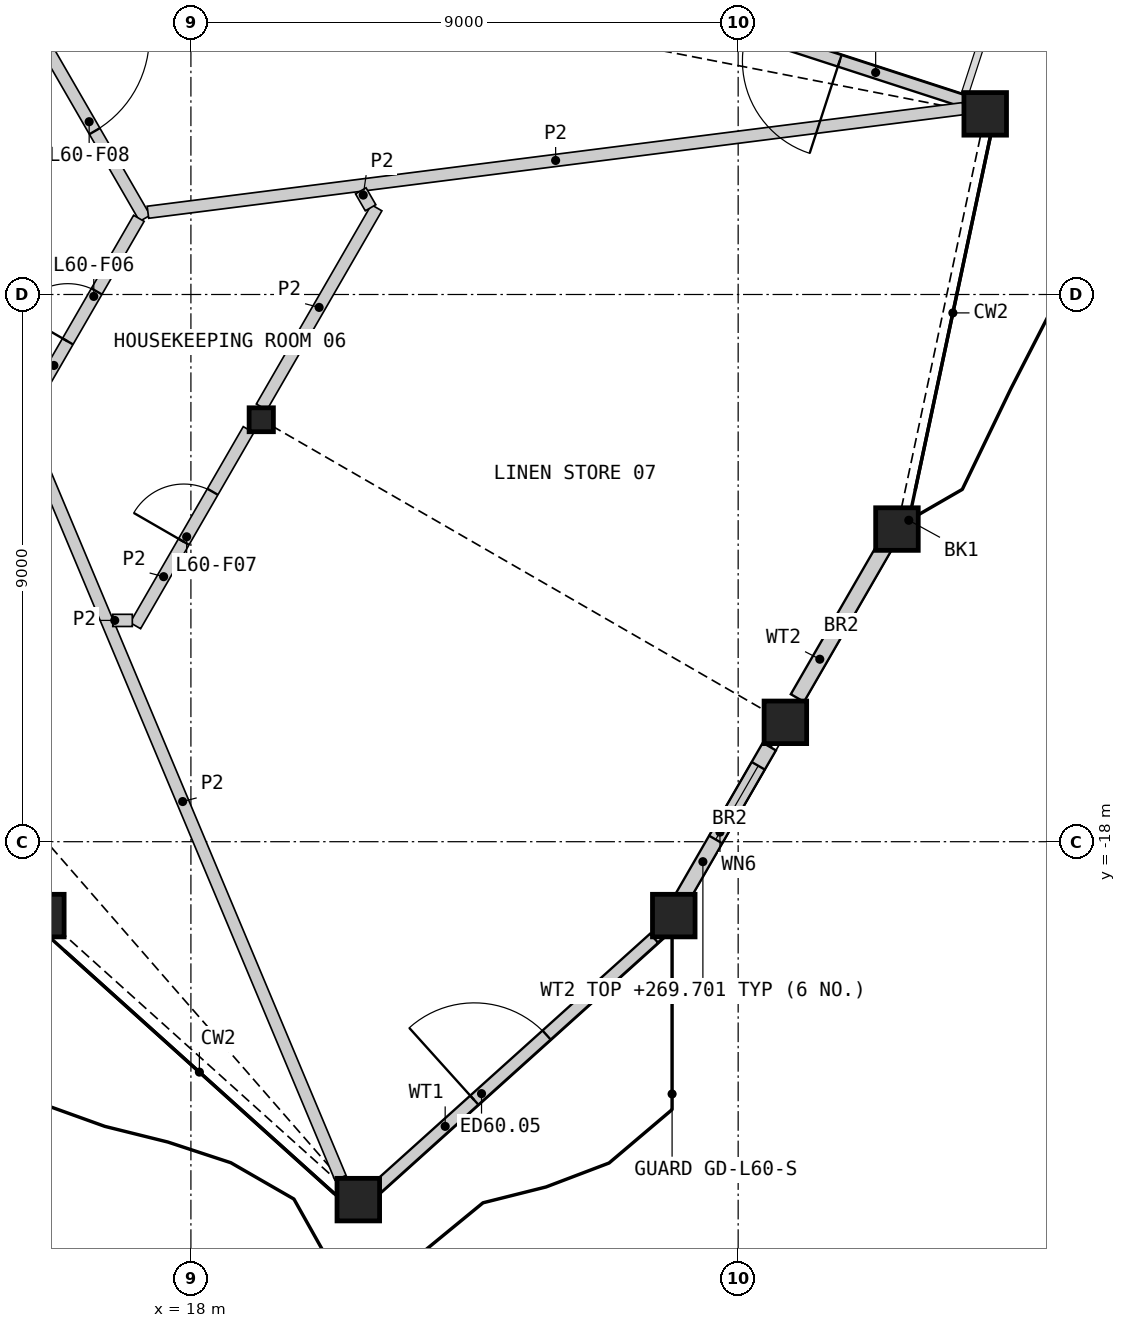
"""IFC4 building model, lengths in metres.
Left out: names, types, materials, properties, quantities, classifications, styles, units other than length and angle.
Written with IfcOpenShell. Run it as: python <this file> out.ifc"""

import sys

from ifc_helpers import new_model, si_unit, direction, frame, frame_2d, origin, origin_2d, place, context, subcontext, project, spatial, rectangle, hollow_rectangle, i_section, extrude, element, fill, save


model = new_model("IFC4")
c1 = context("Model", 3, precision=1e-05, world=origin(), true_north=direction((0.0, 1.0)))
c2 = subcontext(c1, "Body", "Model", "MODEL_VIEW")
j1 = project(units=[si_unit("LENGTHUNIT", "METRE"), si_unit("PLANEANGLEUNIT", "RADIAN")], contexts=[c1])
p1 = place(None, origin())
s1 = spatial("IfcSite", under=j1, at=p1, CompositionType="ELEMENT")
p2 = place(p1, origin())
s2 = spatial("IfcBuilding", under=s1, at=p2, CompositionType="ELEMENT")
p3 = place(p2, frame((0.0, 0.0, 267.0)))
s3 = spatial("IfcBuildingStorey", under=s2, at=p3, CompositionType="ELEMENT", Elevation=267.0)
for number, where, z_axis, x_axis in (
    (1, (15.565, -19.215, 0.0), (0.0, 0.0, 1.0), (1.0, 0.0, 0.0)),
    (2, (20.753, -23.887, 0.0), (0.0, 0.0, 1.0), (1.0, 0.0, 0.0)),
    (3, (25.941, -19.215, 0.0), (0.0, 0.0, 1.0), (1.0, 0.0, 0.0)),
    (4, (27.776, -16.037, 0.0), (0.0, 0.0, 1.0), (1.0, 0.0, 0.0)),
    (5, (29.612, -12.858, 0.0), (0.0, 0.0, 1.0), (1.0, 0.0, 0.0)),
    (6, (31.063, -6.029, 0.0), (0.0, 0.0, 1.0), (1.0, 0.0, 0.0)),
):
    element("IfcColumn", number, at=place(p3, frame(where, z_axis=z_axis, x_axis=x_axis)), inside=s3, PredefinedType="COLUMN", context=c2, shape_type="SweptSolid", body=[
        extrude(hollow_rectangle(XDim=0.7, YDim=0.7, WallThickness=0.045, at=origin_2d()), origin(), (0.0, 0.0, 1.0), 3.6),
    ])
p4 = place(p3, frame((19.157, -11.06, 0.0), z_axis=(0.0, 0.0, 1.0), x_axis=(1.0, 0.0, 0.0)))
e7 = element("IfcColumn", 7, at=p4, inside=s3, PredefinedType="COLUMN", context=c2, shape_type="SweptSolid", body=[
    extrude(i_section(OverallWidth=0.399, OverallDepth=0.393, WebThickness=0.023, FlangeThickness=0.037, at=origin_2d()), origin(), (0.0, 0.0, 1.0), 3.6),
])
p5 = place(p3, frame((21.036, -23.713, 0.0), z_axis=(0.0, 0.0, 1.0), x_axis=(0.743142515738, 0.669133171575, 0.0)))
e8 = element("IfcWall", 8, at=p5, inside=s3, PredefinedType="SOLIDWALL", context=c2, shape_type="SweptSolid", body=[
    extrude(rectangle(XDim=6.166, YDim=0.2, at=frame_2d((3.083, 0.0))), origin(), (0.0, 0.0, 1.0), 2.701),
])
p6 = place(p5, frame((2.186, 0.0, 0.0)))
e9 = element("IfcOpeningElement", 9, at=p6, cuts=e8, PredefinedType="OPENING", context=c2, shape_type="SweptSolid", body=[
    extrude(rectangle(XDim=1.6, YDim=2.4, at=frame_2d((0.8, 1.2))), frame((0.0, 0.11, 0.0), z_axis=(0.0, -1.0, 0.0), x_axis=(1.0, 0.0, 0.0)), (0.0, 0.0, 1.0), 0.22),
])
p7 = place(p3, frame((26.056, -18.96, 0.0), z_axis=(0.0, 0.0, 1.0), x_axis=(0.499949632511, 0.866054481515, 0.0)))
e10 = element("IfcWall", 10, at=p7, inside=s3, PredefinedType="SOLIDWALL", context=c2, shape_type="SweptSolid", body=[
    extrude(rectangle(XDim=2.915, YDim=0.25, at=frame_2d((1.458, 0.0))), origin(), (0.0, 0.0, 1.0), 2.701),
])
p8 = place(p7, frame((1.15, 0.0, 1.9)))
e11 = element("IfcOpeningElement", 11, at=p8, cuts=e10, PredefinedType="OPENING", context=c2, shape_type="SweptSolid", body=[
    extrude(rectangle(XDim=1.4, YDim=0.6, at=frame_2d((0.7, 0.3))), frame((0.0, 0.135, 0.0), z_axis=(0.0, -1.0, 0.0), x_axis=(1.0, 0.0, 0.0)), (0.0, 0.0, 1.0), 0.27),
])
p9 = place(p3, frame((27.974, -15.637, 0.0), z_axis=(0.0, 0.0, 1.0), x_axis=(0.499971101808, 0.86604208752, 0.0)))
e12 = element("IfcWall", 12, at=p9, inside=s3, PredefinedType="SOLIDWALL", context=c2, shape_type="SweptSolid", body=[
    extrude(rectangle(XDim=2.947, YDim=0.25, at=frame_2d((1.473, 0.0))), origin(), (0.0, 0.0, 1.0), 2.701),
])
p10 = place(p3, frame((30.749, -5.832, 0.0), z_axis=(0.0, 0.0, 1.0), x_axis=(-0.95105557136, 0.309019902571, 0.0)))
e13 = element("IfcWall", 13, at=p10, inside=s3, PredefinedType="SOLIDWALL", context=c2, shape_type="SweptSolid", body=[
    extrude(rectangle(XDim=6.257, YDim=0.2, at=frame_2d((3.128, 0.0))), origin(), (0.0, 0.0, 1.0), 2.404),
])
p11 = place(p10, frame((2.186, 0.0, 0.0)))
e14 = element("IfcOpeningElement", 14, at=p11, cuts=e13, PredefinedType="OPENING", context=c2, shape_type="SweptSolid", body=[
    extrude(rectangle(XDim=1.6, YDim=2.4, at=frame_2d((0.8, 1.2))), frame((0.0, 0.11, 0.0), z_axis=(0.0, -1.0, 0.0), x_axis=(1.0, 0.0, 0.0)), (0.0, 0.0, 1.0), 0.22),
])
p12 = place(p3, frame((14.489, -2.975, 0.0), z_axis=(0.0, 0.0, 1.0), x_axis=(0.500017753321, -0.866015153657, 0.0)))
e15 = element("IfcWall", 15, at=p12, inside=s3, PredefinedType="PARTITIONING", context=c2, shape_type="SweptSolid", body=[
    extrude(rectangle(XDim=5.51, YDim=0.2, at=frame_2d((2.755, 0.0))), origin(), (0.0, 0.0, 1.0), 3.25),
])
p13 = place(p12, frame((2.056, 0.0, 0.0)))
e16 = element("IfcOpeningElement", 16, at=p13, cuts=e15, PredefinedType="OPENING", context=c2, shape_type="SweptSolid", body=[
    extrude(rectangle(XDim=1.8, YDim=2.1, at=frame_2d((0.9, 1.05))), frame((0.0, 0.11, 0.0), z_axis=(0.0, -1.0, 0.0), x_axis=(1.0, 0.0, 0.0)), (0.0, 0.0, 1.0), 0.22),
])
p14 = place(p3, frame((15.281, -10.974, 0.0), z_axis=(0.0, 0.0, 1.0), x_axis=(0.499958791762, 0.866049194065, 0.0)))
e17 = element("IfcWall", 17, at=p14, inside=s3, PredefinedType="PARTITIONING", context=c2, shape_type="SweptSolid", body=[
    extrude(rectangle(XDim=3.726, YDim=0.2, at=frame_2d((1.863, 0.0))), origin(), (0.0, 0.0, 1.0), 3.25),
])
p15 = place(p14, frame((1.388, 0.0, 0.0)))
e18 = element("IfcOpeningElement", 18, at=p15, cuts=e17, PredefinedType="OPENING", context=c2, shape_type="SweptSolid", body=[
    extrude(rectangle(XDim=0.95, YDim=2.1, at=frame_2d((0.475, 1.05))), frame((0.0, 0.11, 0.0), z_axis=(0.0, -1.0, 0.0), x_axis=(1.0, 0.0, 0.0)), (0.0, 0.0, 1.0), 0.22),
])
p16 = place(p3, frame((17.293, -7.648, 0.0), z_axis=(0.0, 0.0, 1.0), x_axis=(0.992013080374, 0.126135040205, 0.0)))
e19 = element("IfcWall", 19, at=p16, inside=s3, PredefinedType="PARTITIONING", context=c2, shape_type="SweptSolid", body=[
    extrude(rectangle(XDim=13.518, YDim=0.2, at=frame_2d((6.759, 0.0))), origin(), (0.0, 0.0, 1.0), 2.404),
])
p17 = place(p3, frame((15.27, -11.153, 0.0), z_axis=(0.0, 0.0, 1.0), x_axis=(0.386788567553, -0.922168424969, 0.0)))
e20 = element("IfcWall", 20, at=p17, inside=s3, PredefinedType="PARTITIONING", context=c2, shape_type="SweptSolid", body=[
    extrude(rectangle(XDim=13.419, YDim=0.2, at=frame_2d((6.709, 0.0))), origin(), (0.0, 0.0, 1.0), 2.404),
])
p18 = place(p3, frame((19.162, -10.851, 0.0), z_axis=(0.0, 0.0, 1.0), x_axis=(0.500011000363, 0.866019052629, 0.0)))
e21 = element("IfcWall", 21, at=p18, inside=s3, PredefinedType="PARTITIONING", context=c2, shape_type="SweptSolid", body=[
    extrude(rectangle(XDim=3.784, YDim=0.2, at=frame_2d((1.892, 0.0))), origin(), (0.0, 0.0, 1.0), 2.404),
])
p19 = place(p3, frame((17.086, -14.447, 0.0), z_axis=(0.0, 0.0, 1.0), x_axis=(0.500004411858, 0.866022856582, 0.0)))
e22 = element("IfcWall", 22, at=p19, inside=s3, PredefinedType="PARTITIONING", context=c2, shape_type="SweptSolid", body=[
    extrude(rectangle(XDim=3.723, YDim=0.2, at=frame_2d((1.861, 0.0))), origin(), (0.0, 0.0, 1.0), 2.404),
])
p20 = place(p19, frame((1.593, 0.0, 0.0)))
e23 = element("IfcOpeningElement", 23, at=p20, cuts=e22, PredefinedType="OPENING", context=c2, shape_type="SweptSolid", body=[
    extrude(rectangle(XDim=0.95, YDim=2.1, at=frame_2d((0.475, 1.05))), frame((0.0, 0.11, 0.0), z_axis=(0.0, -1.0, 0.0), x_axis=(1.0, 0.0, 0.0)), (0.0, 0.0, 1.0), 0.22),
])
p21 = place(p3, frame((20.794, -7.295, 0.0), z_axis=(0.0, 0.0, 1.0), x_axis=(0.499897828833, -0.8660843843, 0.0)))
e24 = element("IfcWall", 24, at=p21, inside=s3, PredefinedType="PARTITIONING", context=c2, shape_type="SweptSolid", body=[
    extrude(rectangle(XDim=0.321, YDim=0.2, at=frame_2d((0.161, 0.0))), origin(), (0.0, 0.0, 1.0), 2.404),
])
p22 = place(p3, frame((16.715, -14.36, 0.0), z_axis=(0.0, 0.0, 1.0), x_axis=(1.0, 0.0, 0.0)))
e25 = element("IfcWall", 25, at=p22, inside=s3, PredefinedType="PARTITIONING", context=c2, shape_type="SweptSolid", body=[
    extrude(rectangle(XDim=0.321, YDim=0.2, at=frame_2d((0.161, 0.0))), origin(), (0.0, 0.0, 1.0), 2.404),
])
p23 = place(p6, origin())
e26 = element("IfcDoor", 26, at=p23, inside=s3, OperationType="DOUBLE_DOOR_SINGLE_SWING", PredefinedType="DOOR", context=c2, shape_type="SweptSolid", body=[
    extrude(rectangle(XDim=1.6, YDim=2.4, at=frame_2d((0.8, 1.2))), frame((0.0, 0.025, 0.0), z_axis=(0.0, -1.0, 0.0), x_axis=(1.0, 0.0, 0.0)), (0.0, 0.0, 1.0), 0.05),
])
fill(e9, e26)
p24 = place(p8, origin())
e27 = element("IfcWindow", 27, at=p24, inside=s3, PartitioningType="SINGLE_PANEL", PredefinedType="WINDOW", context=c2, shape_type="SweptSolid", body=[
    extrude(rectangle(XDim=1.4, YDim=0.6, at=frame_2d((0.7, 0.3))), frame((0.0, 0.03, 0.0), z_axis=(0.0, -1.0, 0.0), x_axis=(1.0, 0.0, 0.0)), (0.0, 0.0, 1.0), 0.06),
])
fill(e11, e27)
p25 = place(p11, origin())
e28 = element("IfcDoor", 28, at=p25, inside=s3, OperationType="DOUBLE_DOOR_SINGLE_SWING", PredefinedType="DOOR", context=c2, shape_type="SweptSolid", body=[
    extrude(rectangle(XDim=1.6, YDim=2.4, at=frame_2d((0.8, 1.2))), frame((0.0, 0.025, 0.0), z_axis=(0.0, -1.0, 0.0), x_axis=(1.0, 0.0, 0.0)), (0.0, 0.0, 1.0), 0.05),
])
fill(e14, e28)
p26 = place(p15, origin())
e29 = element("IfcDoor", 29, at=p26, inside=s3, OperationType="SINGLE_SWING_LEFT", PredefinedType="DOOR", context=c2, shape_type="SweptSolid", body=[
    extrude(rectangle(XDim=0.95, YDim=2.1, at=frame_2d((0.475, 1.05))), frame((0.0, 0.025, 0.0), z_axis=(0.0, -1.0, 0.0), x_axis=(1.0, 0.0, 0.0)), (0.0, 0.0, 1.0), 0.05),
])
fill(e18, e29)
p27 = place(p20, origin())
e30 = element("IfcDoor", 30, at=p27, inside=s3, OperationType="SINGLE_SWING_LEFT", PredefinedType="DOOR", context=c2, shape_type="SweptSolid", body=[
    extrude(rectangle(XDim=0.95, YDim=2.1, at=frame_2d((0.475, 1.05))), frame((0.0, 0.025, 0.0), z_axis=(0.0, -1.0, 0.0), x_axis=(1.0, 0.0, 0.0)), (0.0, 0.0, 1.0), 0.05),
])
fill(e23, e30)
p28 = place(p13, origin())
e31 = element("IfcDoor", 31, at=p28, inside=s3, OperationType="DOUBLE_DOOR_SINGLE_SWING", PredefinedType="DOOR", context=c2, shape_type="SweptSolid", body=[
    extrude(rectangle(XDim=1.8, YDim=2.1, at=frame_2d((0.9, 1.05))), frame((0.0, 0.025, 0.0), z_axis=(0.0, -1.0, 0.0), x_axis=(1.0, 0.0, 0.0)), (0.0, 0.0, 1.0), 0.05),
])
fill(e16, e31)
save(model, sys.argv[1])
